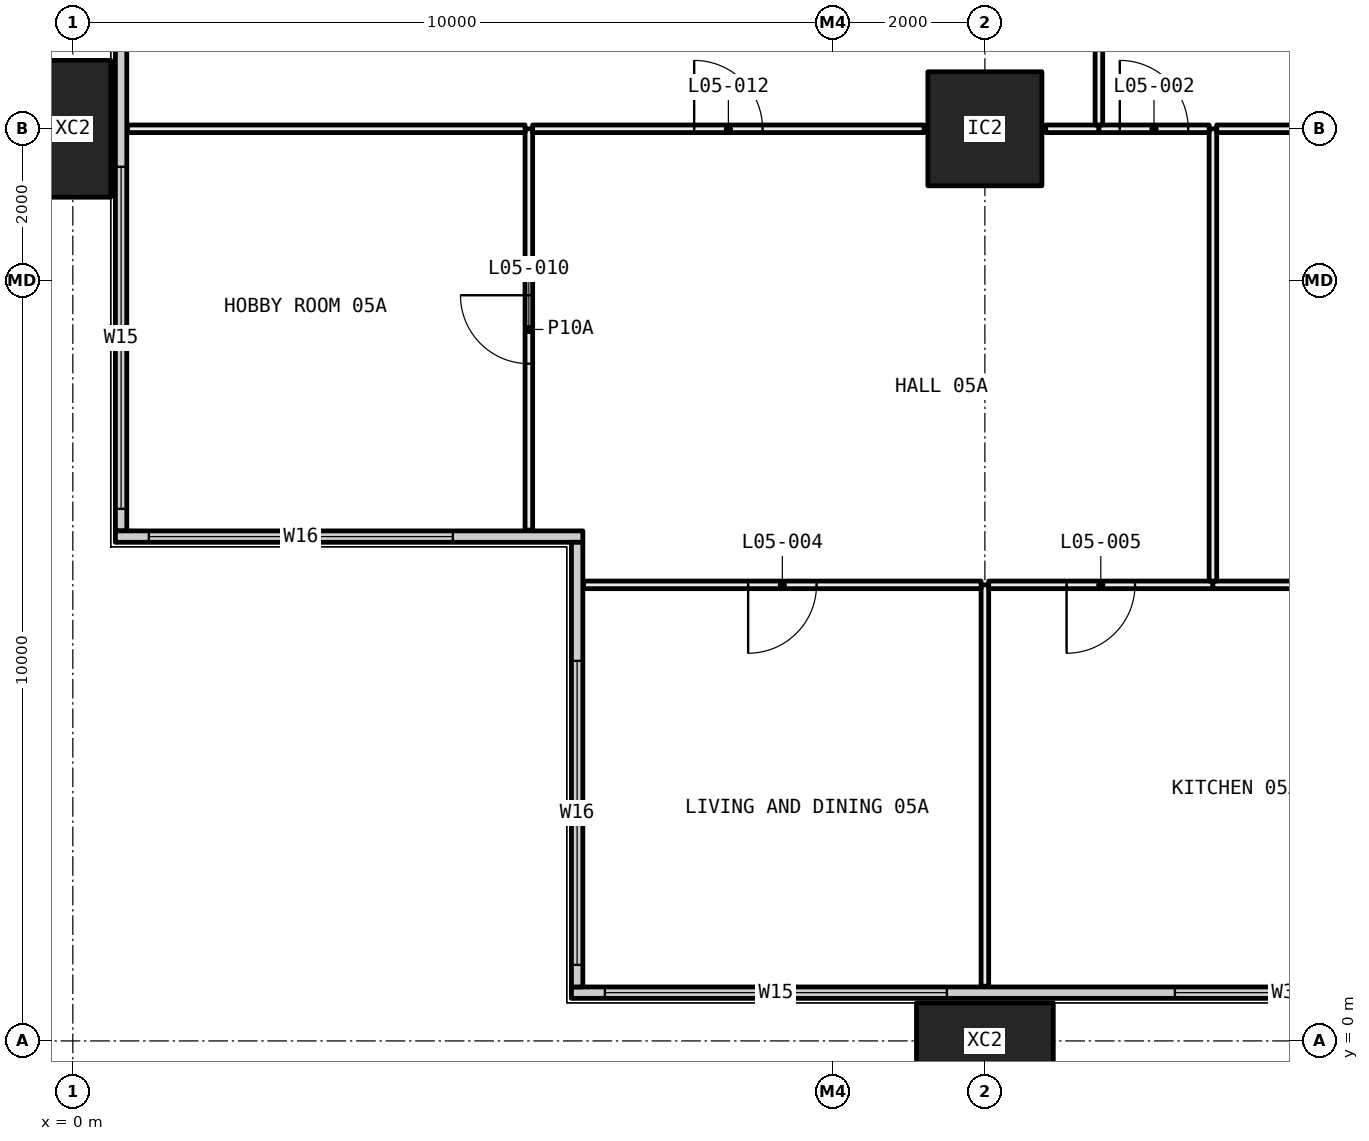
"""IFC4 building model, lengths in metres.
Left out: names, types, materials, properties, quantities, classifications, styles, units other than length and angle.
Written with IfcOpenShell. Run it as: python <this file> out.ifc"""

import sys

from ifc_helpers import new_model, si_unit, direction, frame, frame_2d, origin, origin_2d, place, context, subcontext, project, spatial, rectangle, hollow_rectangle, extrude, element, fill, save


model = new_model("IFC4")
c1 = context("Model", 3, precision=1e-05, world=origin(), true_north=direction((0.0, 1.0)))
c2 = subcontext(c1, "Body", "Model", "MODEL_VIEW")
j1 = project(units=[si_unit("LENGTHUNIT", "METRE"), si_unit("PLANEANGLEUNIT", "RADIAN")], contexts=[c1])
p1 = place(None, origin())
s1 = spatial("IfcSite", under=j1, at=p1, CompositionType="ELEMENT")
p2 = place(p1, origin())
s2 = spatial("IfcBuilding", under=s1, at=p2, CompositionType="ELEMENT")
p3 = place(p2, frame((0.0, 0.0, 30.0)))
s3 = spatial("IfcBuildingStorey", under=s2, at=p3, CompositionType="ELEMENT", Elevation=30.0)
for number, where, z_axis, x_axis in (
    (1, (0.0, 12.0, -0.4), (0.0, 0.0, 1.0), (0.0, 1.0, 0.0)),
    (2, (12.0, 0.0, -0.4), (0.0, 0.0, 1.0), (1.0, 0.0, 0.0)),
):
    element("IfcColumn", number, at=place(p3, frame(where, z_axis=z_axis, x_axis=x_axis)), inside=s3, PredefinedType="COLUMN", context=c2, shape_type="SweptSolid", body=[
        extrude(hollow_rectangle(XDim=1.8, YDim=1.0, WallThickness=0.07, at=origin_2d()), origin(), (0.0, 0.0, 1.0), 3.45),
    ])
p4 = place(p3, frame((12.0, 12.0, 0.0), z_axis=(0.0, 0.0, 1.0), x_axis=(1.0, 0.0, 0.0)))
e3 = element("IfcColumn", 3, at=p4, inside=s3, PredefinedType="COLUMN", context=c2, shape_type="SweptSolid", body=[
    extrude(hollow_rectangle(XDim=1.5, YDim=1.5, WallThickness=0.065, at=origin_2d()), origin(), (0.0, 0.0, 1.0), 3.05),
])
p5 = place(p3, frame((6.56, 0.635, 0.0), z_axis=(0.0, 0.0, 1.0), x_axis=(1.0, 0.0, 0.0)))
e4 = element("IfcWall", 4, at=p5, inside=s3, PredefinedType="ELEMENTEDWALL", context=c2, shape_type="SweptSolid", body=[
    extrude(rectangle(XDim=58.88, YDim=0.15, at=frame_2d((29.44, 0.0))), origin(), (0.0, 0.0, 1.0), 3.05),
])
p6 = place(p5, frame((0.44, 0.0, 0.45)))
e5 = element("IfcOpeningElement", 5, at=p6, cuts=e4, PredefinedType="OPENING", context=c2, shape_type="SweptSolid", body=[
    extrude(rectangle(XDim=4.5, YDim=2.55, at=frame_2d((2.25, 1.275))), frame((0.0, 0.085, 0.0), z_axis=(0.0, -1.0, 0.0), x_axis=(1.0, 0.0, 0.0)), (0.0, 0.0, 1.0), 0.17),
])
p7 = place(p5, frame((7.94, 0.0, 0.45)))
e6 = element("IfcOpeningElement", 6, at=p7, cuts=e4, PredefinedType="OPENING", context=c2, shape_type="SweptSolid", body=[
    extrude(rectangle(XDim=3.0, YDim=2.55, at=frame_2d((1.5, 1.275))), frame((0.0, 0.085, 0.0), z_axis=(0.0, -1.0, 0.0), x_axis=(1.0, 0.0, 0.0)), (0.0, 0.0, 1.0), 0.17),
])
p8 = place(p5, frame((11.94, 0.0, 0.45)))
e7 = element("IfcOpeningElement", 7, at=p8, cuts=e4, PredefinedType="OPENING", context=c2, shape_type="SweptSolid", body=[
    extrude(rectangle(XDim=3.0, YDim=2.55, at=frame_2d((1.5, 1.275))), frame((0.0, 0.085, 0.0), z_axis=(0.0, -1.0, 0.0), x_axis=(1.0, 0.0, 0.0)), (0.0, 0.0, 1.0), 0.17),
])
p9 = place(p5, frame((19.94, 0.0, 0.45)))
e8 = element("IfcOpeningElement", 8, at=p9, cuts=e4, PredefinedType="OPENING", context=c2, shape_type="SweptSolid", body=[
    extrude(rectangle(XDim=3.0, YDim=2.55, at=frame_2d((1.5, 1.275))), frame((0.0, 0.085, 0.0), z_axis=(0.0, -1.0, 0.0), x_axis=(1.0, 0.0, 0.0)), (0.0, 0.0, 1.0), 0.17),
])
p10 = place(p5, frame((23.94, 0.0, 0.45)))
e9 = element("IfcOpeningElement", 9, at=p10, cuts=e4, PredefinedType="OPENING", context=c2, shape_type="SweptSolid", body=[
    extrude(rectangle(XDim=2.0, YDim=2.55, at=frame_2d((1.0, 1.275))), frame((0.0, 0.085, 0.0), z_axis=(0.0, -1.0, 0.0), x_axis=(1.0, 0.0, 0.0)), (0.0, 0.0, 1.0), 0.17),
])
p11 = place(p5, frame((31.94, 0.0, 0.45)))
e10 = element("IfcOpeningElement", 10, at=p11, cuts=e4, PredefinedType="OPENING", context=c2, shape_type="SweptSolid", body=[
    extrude(rectangle(XDim=3.0, YDim=2.55, at=frame_2d((1.5, 1.275))), frame((0.0, 0.085, 0.0), z_axis=(0.0, -1.0, 0.0), x_axis=(1.0, 0.0, 0.0)), (0.0, 0.0, 1.0), 0.17),
])
p12 = place(p5, frame((35.94, 0.0, 0.45)))
e11 = element("IfcOpeningElement", 11, at=p12, cuts=e4, PredefinedType="OPENING", context=c2, shape_type="SweptSolid", body=[
    extrude(rectangle(XDim=3.0, YDim=2.55, at=frame_2d((1.5, 1.275))), frame((0.0, 0.085, 0.0), z_axis=(0.0, -1.0, 0.0), x_axis=(1.0, 0.0, 0.0)), (0.0, 0.0, 1.0), 0.17),
])
p13 = place(p5, frame((43.94, 0.0, 0.45)))
e12 = element("IfcOpeningElement", 12, at=p13, cuts=e4, PredefinedType="OPENING", context=c2, shape_type="SweptSolid", body=[
    extrude(rectangle(XDim=3.0, YDim=2.55, at=frame_2d((1.5, 1.275))), frame((0.0, 0.085, 0.0), z_axis=(0.0, -1.0, 0.0), x_axis=(1.0, 0.0, 0.0)), (0.0, 0.0, 1.0), 0.17),
])
p14 = place(p5, frame((47.94, 0.0, 0.45)))
e13 = element("IfcOpeningElement", 13, at=p14, cuts=e4, PredefinedType="OPENING", context=c2, shape_type="SweptSolid", body=[
    extrude(rectangle(XDim=2.0, YDim=2.55, at=frame_2d((1.0, 1.275))), frame((0.0, 0.085, 0.0), z_axis=(0.0, -1.0, 0.0), x_axis=(1.0, 0.0, 0.0)), (0.0, 0.0, 1.0), 0.17),
])
p15 = place(p5, frame((53.94, 0.0, 0.45)))
e14 = element("IfcOpeningElement", 14, at=p15, cuts=e4, PredefinedType="OPENING", context=c2, shape_type="SweptSolid", body=[
    extrude(rectangle(XDim=4.5, YDim=2.55, at=frame_2d((2.25, 1.275))), frame((0.0, 0.085, 0.0), z_axis=(0.0, -1.0, 0.0), x_axis=(1.0, 0.0, 0.0)), (0.0, 0.0, 1.0), 0.17),
])
p16 = place(p3, frame((0.635, 6.71, 0.0), z_axis=(0.0, 0.0, 1.0), x_axis=(0.0, 1.0, 0.0)))
e15 = element("IfcWall", 15, at=p16, inside=s3, PredefinedType="ELEMENTEDWALL", context=c2, shape_type="SweptSolid", body=[
    extrude(rectangle(XDim=34.58, YDim=0.15, at=frame_2d((17.29, 0.0))), origin(), (0.0, 0.0, 1.0), 3.05),
])
p17 = place(p16, frame((0.29, 0.0, 0.45)))
e16 = element("IfcOpeningElement", 16, at=p17, cuts=e15, PredefinedType="OPENING", context=c2, shape_type="SweptSolid", body=[
    extrude(rectangle(XDim=4.5, YDim=2.55, at=frame_2d((2.25, 1.275))), frame((0.0, 0.085, 0.0), z_axis=(0.0, -1.0, 0.0), x_axis=(1.0, 0.0, 0.0)), (0.0, 0.0, 1.0), 0.17),
])
p18 = place(p16, frame((7.79, 0.0, 0.45)))
e17 = element("IfcOpeningElement", 17, at=p18, cuts=e15, PredefinedType="OPENING", context=c2, shape_type="SweptSolid", body=[
    extrude(rectangle(XDim=3.0, YDim=2.55, at=frame_2d((1.5, 1.275))), frame((0.0, 0.085, 0.0), z_axis=(0.0, -1.0, 0.0), x_axis=(1.0, 0.0, 0.0)), (0.0, 0.0, 1.0), 0.17),
])
p19 = place(p16, frame((11.79, 0.0, 0.45)))
e18 = element("IfcOpeningElement", 18, at=p19, cuts=e15, PredefinedType="OPENING", context=c2, shape_type="SweptSolid", body=[
    extrude(rectangle(XDim=3.0, YDim=2.55, at=frame_2d((1.5, 1.275))), frame((0.0, 0.085, 0.0), z_axis=(0.0, -1.0, 0.0), x_axis=(1.0, 0.0, 0.0)), (0.0, 0.0, 1.0), 0.17),
])
p20 = place(p16, frame((19.79, 0.0, 0.45)))
e19 = element("IfcOpeningElement", 19, at=p20, cuts=e15, PredefinedType="OPENING", context=c2, shape_type="SweptSolid", body=[
    extrude(rectangle(XDim=3.0, YDim=2.55, at=frame_2d((1.5, 1.275))), frame((0.0, 0.085, 0.0), z_axis=(0.0, -1.0, 0.0), x_axis=(1.0, 0.0, 0.0)), (0.0, 0.0, 1.0), 0.17),
])
p21 = place(p16, frame((23.79, 0.0, 0.45)))
e20 = element("IfcOpeningElement", 20, at=p21, cuts=e15, PredefinedType="OPENING", context=c2, shape_type="SweptSolid", body=[
    extrude(rectangle(XDim=2.0, YDim=2.55, at=frame_2d((1.0, 1.275))), frame((0.0, 0.085, 0.0), z_axis=(0.0, -1.0, 0.0), x_axis=(1.0, 0.0, 0.0)), (0.0, 0.0, 1.0), 0.17),
])
p22 = place(p16, frame((29.79, 0.0, 0.45)))
e21 = element("IfcOpeningElement", 21, at=p22, cuts=e15, PredefinedType="OPENING", context=c2, shape_type="SweptSolid", body=[
    extrude(rectangle(XDim=4.5, YDim=2.55, at=frame_2d((2.25, 1.275))), frame((0.0, 0.085, 0.0), z_axis=(0.0, -1.0, 0.0), x_axis=(1.0, 0.0, 0.0)), (0.0, 0.0, 1.0), 0.17),
])
p23 = place(p3, frame((0.56, 6.635, 0.0), z_axis=(0.0, 0.0, 1.0), x_axis=(1.0, 0.0, 0.0)))
e22 = element("IfcWall", 22, at=p23, inside=s3, PredefinedType="ELEMENTEDWALL", context=c2, shape_type="SweptSolid", body=[
    extrude(rectangle(XDim=6.15, YDim=0.15, at=frame_2d((3.075, 0.0))), origin(), (0.0, 0.0, 1.0), 3.05),
])
p24 = place(p23, frame((0.44, 0.0, 0.45)))
e23 = element("IfcOpeningElement", 23, at=p24, cuts=e22, PredefinedType="OPENING", context=c2, shape_type="SweptSolid", body=[
    extrude(rectangle(XDim=4.0, YDim=2.55, at=frame_2d((2.0, 1.275))), frame((0.0, 0.085, 0.0), z_axis=(0.0, -1.0, 0.0), x_axis=(1.0, 0.0, 0.0)), (0.0, 0.0, 1.0), 0.17),
])
p25 = place(p3, frame((6.635, 0.71, 0.0), z_axis=(0.0, 0.0, 1.0), x_axis=(0.0, 1.0, 0.0)))
e24 = element("IfcWall", 24, at=p25, inside=s3, PredefinedType="ELEMENTEDWALL", context=c2, shape_type="SweptSolid", body=[
    extrude(rectangle(XDim=5.85, YDim=0.15, at=frame_2d((2.925, 0.0))), origin(), (0.0, 0.0, 1.0), 3.05),
])
p26 = place(p25, frame((0.29, 0.0, 0.45)))
e25 = element("IfcOpeningElement", 25, at=p26, cuts=e24, PredefinedType="OPENING", context=c2, shape_type="SweptSolid", body=[
    extrude(rectangle(XDim=4.0, YDim=2.55, at=frame_2d((2.0, 1.275))), frame((0.0, 0.085, 0.0), z_axis=(0.0, -1.0, 0.0), x_axis=(1.0, 0.0, 0.0)), (0.0, 0.0, 1.0), 0.17),
])
p27 = place(p3, frame((12.0, 0.72, 0.0), z_axis=(0.0, 0.0, 1.0), x_axis=(0.0, 1.0, 0.0)))
e26 = element("IfcWall", 26, at=p27, inside=s3, PredefinedType="PARTITIONING", context=c2, shape_type="SweptSolid", body=[
    extrude(rectangle(XDim=5.28, YDim=0.1, at=frame_2d((2.64, 0.0))), origin(), (0.0, 0.0, 1.0), 2.45),
])
p28 = place(p3, frame((11.95, 6.0, 0.0), z_axis=(0.0, 0.0, 1.0), x_axis=(-1.0, 0.0, 0.0)))
e27 = element("IfcWall", 27, at=p28, inside=s3, PredefinedType="PARTITIONING", context=c2, shape_type="SweptSolid", body=[
    extrude(rectangle(XDim=5.23, YDim=0.1, at=frame_2d((2.615, 0.0))), origin(), (0.0, 0.0, 1.0), 2.45),
])
p29 = place(p28, frame((2.165, 0.0, 0.0)))
e28 = element("IfcOpeningElement", 28, at=p29, cuts=e27, PredefinedType="OPENING", context=c2, shape_type="SweptSolid", body=[
    extrude(rectangle(XDim=0.9, YDim=2.1, at=frame_2d((0.45, 1.05))), frame((0.0, 0.06, 0.0), z_axis=(0.0, -1.0, 0.0), x_axis=(1.0, 0.0, 0.0)), (0.0, 0.0, 1.0), 0.12),
])
p30 = place(p3, frame((15.0, 6.0, 0.0), z_axis=(0.0, 0.0, 1.0), x_axis=(-1.0, 0.0, 0.0)))
e29 = element("IfcWall", 29, at=p30, inside=s3, PredefinedType="PARTITIONING", context=c2, shape_type="SweptSolid", body=[
    extrude(rectangle(XDim=2.95, YDim=0.1, at=frame_2d((1.475, 0.0))), origin(), (0.0, 0.0, 1.0), 2.45),
])
p31 = place(p30, frame((1.025, 0.0, 0.0)))
e30 = element("IfcOpeningElement", 30, at=p31, cuts=e29, PredefinedType="OPENING", context=c2, shape_type="SweptSolid", body=[
    extrude(rectangle(XDim=0.9, YDim=2.1, at=frame_2d((0.45, 1.05))), frame((0.0, 0.06, 0.0), z_axis=(0.0, -1.0, 0.0), x_axis=(1.0, 0.0, 0.0)), (0.0, 0.0, 1.0), 0.12),
])
p32 = place(p3, frame((17.95, 6.0, 0.0), z_axis=(0.0, 0.0, 1.0), x_axis=(-1.0, 0.0, 0.0)))
e31 = element("IfcWall", 31, at=p32, inside=s3, PredefinedType="PARTITIONING", context=c2, shape_type="SweptSolid", body=[
    extrude(rectangle(XDim=2.95, YDim=0.1, at=frame_2d((1.475, 0.0))), origin(), (0.0, 0.0, 1.0), 3.05),
])
p33 = place(p3, frame((6.0, 6.72, 0.0), z_axis=(0.0, 0.0, 1.0), x_axis=(0.0, 1.0, 0.0)))
e32 = element("IfcWall", 32, at=p33, inside=s3, PredefinedType="PARTITIONING", context=c2, shape_type="SweptSolid", body=[
    extrude(rectangle(XDim=5.28, YDim=0.1, at=frame_2d((2.64, 0.0))), origin(), (0.0, 0.0, 1.0), 2.45),
])
p34 = place(p33, frame((2.19, 0.0, 0.0)))
e33 = element("IfcOpeningElement", 33, at=p34, cuts=e32, PredefinedType="OPENING", context=c2, shape_type="SweptSolid", body=[
    extrude(rectangle(XDim=0.9, YDim=2.1, at=frame_2d((0.45, 1.05))), frame((0.0, 0.06, 0.0), z_axis=(0.0, -1.0, 0.0), x_axis=(1.0, 0.0, 0.0)), (0.0, 0.0, 1.0), 0.12),
])
p35 = place(p3, frame((5.95, 12.0, 0.0), z_axis=(0.0, 0.0, 1.0), x_axis=(-1.0, 0.0, 0.0)))
e34 = element("IfcWall", 34, at=p35, inside=s3, PredefinedType="PARTITIONING", context=c2, shape_type="SweptSolid", body=[
    extrude(rectangle(XDim=5.23, YDim=0.1, at=frame_2d((2.615, 0.0))), origin(), (0.0, 0.0, 1.0), 2.45),
])
p36 = place(p3, frame((15.0, 6.05, 0.0), z_axis=(0.0, 0.0, 1.0), x_axis=(0.0, 1.0, 0.0)))
e35 = element("IfcWall", 35, at=p36, inside=s3, PredefinedType="PARTITIONING", context=c2, shape_type="SweptSolid", body=[
    extrude(rectangle(XDim=5.95, YDim=0.1, at=frame_2d((2.975, 0.0))), origin(), (0.0, 0.0, 1.0), 2.45),
])
p37 = place(p3, frame((11.2, 12.0, 0.0), z_axis=(0.0, 0.0, 1.0), x_axis=(-1.0, 0.0, 0.0)))
e36 = element("IfcWall", 36, at=p37, inside=s3, PredefinedType="PARTITIONING", context=c2, shape_type="SweptSolid", body=[
    extrude(rectangle(XDim=5.15, YDim=0.1, at=frame_2d((2.575, 0.0))), origin(), (0.0, 0.0, 1.0), 2.45),
])
p38 = place(p37, frame((2.125, 0.0, 0.0)))
e37 = element("IfcOpeningElement", 37, at=p38, cuts=e36, PredefinedType="OPENING", context=c2, shape_type="SweptSolid", body=[
    extrude(rectangle(XDim=0.9, YDim=2.1, at=frame_2d((0.45, 1.05))), frame((0.0, 0.06, 0.0), z_axis=(0.0, -1.0, 0.0), x_axis=(1.0, 0.0, 0.0)), (0.0, 0.0, 1.0), 0.12),
])
p39 = place(p3, frame((13.5, 12.0, 0.0), z_axis=(0.0, 0.0, 1.0), x_axis=(-1.0, 0.0, 0.0)))
e38 = element("IfcWall", 38, at=p39, inside=s3, PredefinedType="PARTITIONING", context=c2, shape_type="SweptSolid", body=[
    extrude(rectangle(XDim=0.7, YDim=0.1, at=frame_2d((0.35, 0.0))), origin(), (0.0, 0.0, 1.0), 2.45),
])
p40 = place(p3, frame((14.95, 12.0, 0.0), z_axis=(0.0, 0.0, 1.0), x_axis=(-1.0, 0.0, 0.0)))
e39 = element("IfcWall", 39, at=p40, inside=s3, PredefinedType="PARTITIONING", context=c2, shape_type="SweptSolid", body=[
    extrude(rectangle(XDim=1.45, YDim=0.1, at=frame_2d((0.725, 0.0))), origin(), (0.0, 0.0, 1.0), 2.45),
])
p41 = place(p40, frame((0.275, 0.0, 0.0)))
e40 = element("IfcOpeningElement", 40, at=p41, cuts=e39, PredefinedType="OPENING", context=c2, shape_type="SweptSolid", body=[
    extrude(rectangle(XDim=0.9, YDim=2.1, at=frame_2d((0.45, 1.05))), frame((0.0, 0.06, 0.0), z_axis=(0.0, -1.0, 0.0), x_axis=(1.0, 0.0, 0.0)), (0.0, 0.0, 1.0), 0.12),
])
p42 = place(p3, frame((18.0, 12.0, 0.0), z_axis=(0.0, 0.0, 1.0), x_axis=(-1.0, 0.0, 0.0)))
e41 = element("IfcWall", 41, at=p42, inside=s3, PredefinedType="PARTITIONING", context=c2, shape_type="SweptSolid", body=[
    extrude(rectangle(XDim=2.95, YDim=0.1, at=frame_2d((1.475, 0.0))), origin(), (0.0, 0.0, 1.0), 2.45),
])
p43 = place(p42, frame((1.025, 0.0, 0.0)))
e42 = element("IfcOpeningElement", 42, at=p43, cuts=e41, PredefinedType="OPENING", context=c2, shape_type="SweptSolid", body=[
    extrude(rectangle(XDim=0.9, YDim=2.1, at=frame_2d((0.45, 1.05))), frame((0.0, 0.06, 0.0), z_axis=(0.0, -1.0, 0.0), x_axis=(1.0, 0.0, 0.0)), (0.0, 0.0, 1.0), 0.12),
])
p44 = place(p3, frame((13.5, 12.05, 0.0), z_axis=(0.0, 0.0, 1.0), x_axis=(0.0, 1.0, 0.0)))
e43 = element("IfcWall", 43, at=p44, inside=s3, PredefinedType="PARTITIONING", context=c2, shape_type="SweptSolid", body=[
    extrude(rectangle(XDim=5.85, YDim=0.1, at=frame_2d((2.925, 0.0))), origin(), (0.0, 0.0, 1.0), 2.45),
])
p45 = place(p6, origin())
e44 = element("IfcWindow", 44, at=p45, inside=s3, PartitioningType="SINGLE_PANEL", PredefinedType="WINDOW", context=c2, shape_type="SweptSolid", body=[
    extrude(rectangle(XDim=4.5, YDim=2.55, at=frame_2d((2.25, 1.275))), frame((0.0, 0.03, 0.0), z_axis=(0.0, -1.0, 0.0), x_axis=(1.0, 0.0, 0.0)), (0.0, 0.0, 1.0), 0.06),
])
fill(e5, e44)
p46 = place(p7, origin())
e45 = element("IfcWindow", 45, at=p46, inside=s3, PartitioningType="SINGLE_PANEL", PredefinedType="WINDOW", context=c2, shape_type="SweptSolid", body=[
    extrude(rectangle(XDim=3.0, YDim=2.55, at=frame_2d((1.5, 1.275))), frame((0.0, 0.03, 0.0), z_axis=(0.0, -1.0, 0.0), x_axis=(1.0, 0.0, 0.0)), (0.0, 0.0, 1.0), 0.06),
])
fill(e6, e45)
p47 = place(p17, origin())
e46 = element("IfcWindow", 46, at=p47, inside=s3, PartitioningType="SINGLE_PANEL", PredefinedType="WINDOW", context=c2, shape_type="SweptSolid", body=[
    extrude(rectangle(XDim=4.5, YDim=2.55, at=frame_2d((2.25, 1.275))), frame((0.0, 0.03, 0.0), z_axis=(0.0, -1.0, 0.0), x_axis=(1.0, 0.0, 0.0)), (0.0, 0.0, 1.0), 0.06),
])
fill(e16, e46)
p48 = place(p24, origin())
e47 = element("IfcWindow", 47, at=p48, inside=s3, PartitioningType="SINGLE_PANEL", PredefinedType="WINDOW", context=c2, shape_type="SweptSolid", body=[
    extrude(rectangle(XDim=4.0, YDim=2.55, at=frame_2d((2.0, 1.275))), frame((0.0, 0.03, 0.0), z_axis=(0.0, -1.0, 0.0), x_axis=(1.0, 0.0, 0.0)), (0.0, 0.0, 1.0), 0.06),
])
fill(e23, e47)
p49 = place(p26, origin())
e48 = element("IfcWindow", 48, at=p49, inside=s3, PartitioningType="SINGLE_PANEL", PredefinedType="WINDOW", context=c2, shape_type="SweptSolid", body=[
    extrude(rectangle(XDim=4.0, YDim=2.55, at=frame_2d((2.0, 1.275))), frame((0.0, 0.03, 0.0), z_axis=(0.0, -1.0, 0.0), x_axis=(1.0, 0.0, 0.0)), (0.0, 0.0, 1.0), 0.06),
])
fill(e25, e48)
p50 = place(p41, frame((0.9, 0.0, 0.0), x_axis=(-1.0, 0.0, 0.0)))
e49 = element("IfcDoor", 49, at=p50, inside=s3, OperationType="SINGLE_SWING_RIGHT", PredefinedType="DOOR", context=c2, shape_type="SweptSolid", body=[
    extrude(rectangle(XDim=0.9, YDim=2.1, at=frame_2d((0.45, 1.05))), frame((0.0, 0.025, 0.0), z_axis=(0.0, -1.0, 0.0), x_axis=(1.0, 0.0, 0.0)), (0.0, 0.0, 1.0), 0.05),
])
fill(e40, e49)
p51 = place(p29, origin())
e50 = element("IfcDoor", 50, at=p51, inside=s3, OperationType="SINGLE_SWING_LEFT", PredefinedType="DOOR", context=c2, shape_type="SweptSolid", body=[
    extrude(rectangle(XDim=0.9, YDim=2.1, at=frame_2d((0.45, 1.05))), frame((0.0, 0.025, 0.0), z_axis=(0.0, -1.0, 0.0), x_axis=(1.0, 0.0, 0.0)), (0.0, 0.0, 1.0), 0.05),
])
fill(e28, e50)
p52 = place(p31, origin())
e51 = element("IfcDoor", 51, at=p52, inside=s3, OperationType="SINGLE_SWING_LEFT", PredefinedType="DOOR", context=c2, shape_type="SweptSolid", body=[
    extrude(rectangle(XDim=0.9, YDim=2.1, at=frame_2d((0.45, 1.05))), frame((0.0, 0.025, 0.0), z_axis=(0.0, -1.0, 0.0), x_axis=(1.0, 0.0, 0.0)), (0.0, 0.0, 1.0), 0.05),
])
fill(e30, e51)
p53 = place(p34, origin())
e52 = element("IfcDoor", 52, at=p53, inside=s3, OperationType="SINGLE_SWING_LEFT", PredefinedType="DOOR", context=c2, shape_type="SweptSolid", body=[
    extrude(rectangle(XDim=0.9, YDim=2.1, at=frame_2d((0.45, 1.05))), frame((0.0, 0.025, 0.0), z_axis=(0.0, -1.0, 0.0), x_axis=(1.0, 0.0, 0.0)), (0.0, 0.0, 1.0), 0.05),
])
fill(e33, e52)
p54 = place(p38, frame((0.9, 0.0, 0.0), x_axis=(-1.0, 0.0, 0.0)))
e53 = element("IfcDoor", 53, at=p54, inside=s3, OperationType="SINGLE_SWING_RIGHT", PredefinedType="DOOR", context=c2, shape_type="SweptSolid", body=[
    extrude(rectangle(XDim=0.9, YDim=2.1, at=frame_2d((0.45, 1.05))), frame((0.0, 0.025, 0.0), z_axis=(0.0, -1.0, 0.0), x_axis=(1.0, 0.0, 0.0)), (0.0, 0.0, 1.0), 0.05),
])
fill(e37, e53)
save(model, sys.argv[1])
